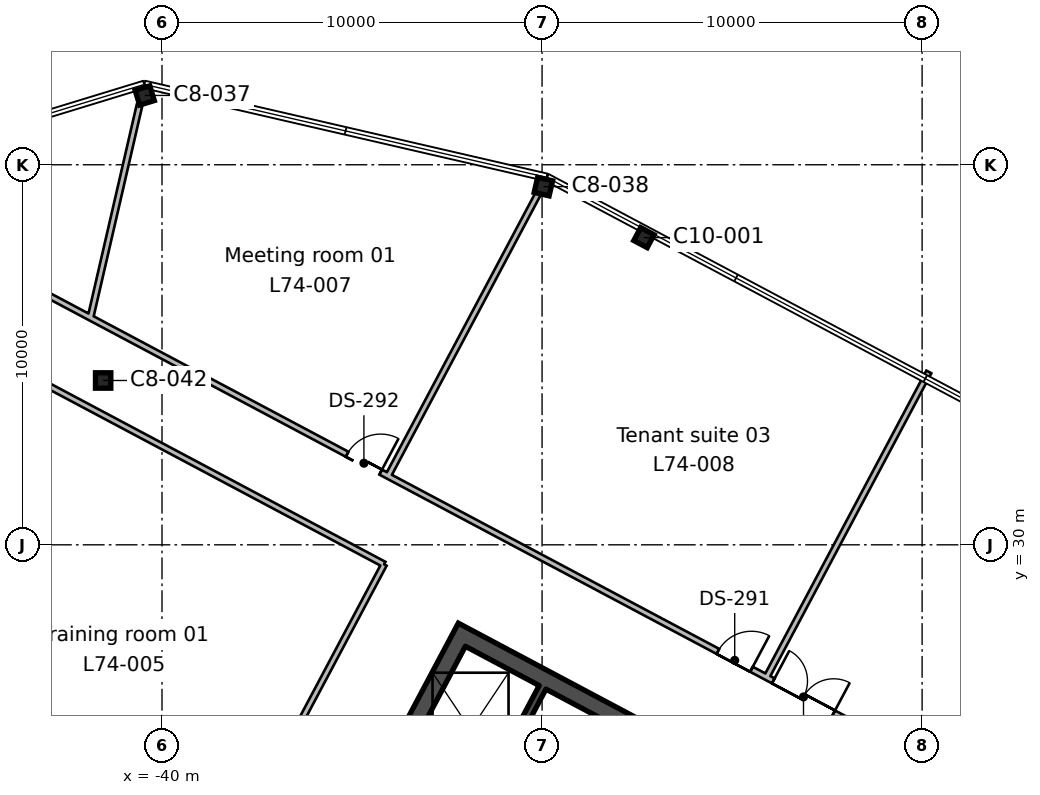
"""IFC4 building model, lengths in metres.
Left out: names, types, materials, properties, quantities, classifications, styles, units other than length and angle.
Written with IfcOpenShell. Run it as: python <this file> out.ifc"""

import sys

from ifc_helpers import new_model, si_unit, direction, frame, frame_2d, origin, origin_2d, place, context, subcontext, project, spatial, rectangle, i_section, extrude, element, fill, save


model = new_model("IFC4")
c1 = context("Model", 3, precision=1e-05, world=origin(), true_north=direction((0.0, 1.0)))
c2 = subcontext(c1, "Body", "Model", "MODEL_VIEW")
j1 = project(units=[si_unit("LENGTHUNIT", "METRE"), si_unit("PLANEANGLEUNIT", "RADIAN")], contexts=[c1])
p1 = place(None, origin())
s1 = spatial("IfcSite", under=j1, at=p1, CompositionType="ELEMENT")
p2 = place(p1, origin())
s2 = spatial("IfcBuilding", under=s1, at=p2, CompositionType="ELEMENT")
p3 = place(p2, frame((0.0, 0.0, 324.3)))
s3 = spatial("IfcBuildingStorey", under=s2, at=p3, CompositionType="ELEMENT", Elevation=324.3)
p4 = place(p3, frame((-41.549, 34.324, 0.0), z_axis=(0.0, 0.0, 1.0), x_axis=(1.0, 0.0, 0.0)))
e1 = element("IfcColumn", 1, at=p4, inside=s3, PredefinedType="COLUMN", context=c2, shape_type="SweptSolid", body=[
    extrude(i_section(OverallWidth=0.404, OverallDepth=0.406, WebThickness=0.027, FlangeThickness=0.044, FilletRadius=0.015, at=origin_2d()), origin(), (0.0, 0.0, 1.0), 3.9),
])
p5 = place(p3, frame((-27.319, 38.083, 0.0), z_axis=(0.0, 0.0, 1.0), x_axis=(-0.882947592859, 0.469471562786, 0.0)))
e2 = element("IfcColumn", 2, at=p5, inside=s3, PredefinedType="COLUMN", context=c2, shape_type="SweptSolid", body=[
    extrude(i_section(OverallWidth=0.399, OverallDepth=0.386, WebThickness=0.021, FlangeThickness=0.033, FilletRadius=0.015, at=origin_2d()), origin(), (0.0, 0.0, 1.0), 3.9),
])
for number, where, z_axis, x_axis in (
    (3, (-29.965, 39.425, 0.0), (0.0, 0.0, 1.0), (-0.974, 0.225, 0.0)),
    (4, (-40.455, 41.824, 0.0), (0.0, 0.0, 1.0), (-0.956, -0.292, 0.0)),
):
    element("IfcColumn", number, at=place(p3, frame(where, z_axis=z_axis, x_axis=x_axis)), inside=s3, PredefinedType="COLUMN", context=c2, shape_type="SweptSolid", body=[
        extrude(i_section(OverallWidth=0.404, OverallDepth=0.406, WebThickness=0.027, FlangeThickness=0.044, FilletRadius=0.015, at=origin_2d()), origin(), (0.0, 0.0, 1.0), 3.9),
    ])
p6 = place(p3, frame((-32.004, 27.833, 0.0), z_axis=(0.0, 0.0, 1.0), x_axis=(-0.469467968382, -0.882949504028, 0.0)))
e5 = element("IfcWall", 5, at=p6, inside=s3, PredefinedType="SHEAR", context=c2, shape_type="SweptSolid", body=[
    extrude(rectangle(XDim=19.1, YDim=0.45, at=frame_2d((9.55, 0.0))), origin(), (0.0, 0.0, 1.0), 3.9),
])
p7 = place(p6, frame((10.15, 0.0, 0.0)))
e6 = element("IfcOpeningElement", 6, at=p7, cuts=e5, PredefinedType="OPENING", context=c2, shape_type="SweptSolid", body=[
    extrude(rectangle(XDim=2.4, YDim=2.4, at=frame_2d((1.2, 1.2))), frame((0.0, 0.235, 0.0), z_axis=(0.0, -1.0, 0.0), x_axis=(1.0, 0.0, 0.0)), (0.0, 0.0, 1.0), 0.47),
])
p8 = place(p3, frame((-14.076, 18.045, 0.0), z_axis=(0.0, 0.0, 1.0), x_axis=(-0.882947755831, 0.46947125628, 0.0)))
e7 = element("IfcWall", 7, at=p8, inside=s3, PredefinedType="SHEAR", context=c2, shape_type="SweptSolid", body=[
    extrude(rectangle(XDim=20.2, YDim=0.45, at=frame_2d((10.1, 0.0))), origin(), (0.0, 0.0, 1.0), 3.9),
])
p9 = place(p3, frame((-29.986, 26.25, 0.0), z_axis=(0.0, 0.0, 1.0), x_axis=(-0.469494272526, -0.882935517501, 0.0)))
e8 = element("IfcWall", 8, at=p9, inside=s3, PredefinedType="SHEAR", context=c2, shape_type="SweptSolid", body=[
    extrude(rectangle(XDim=3.65, YDim=0.2, at=frame_2d((1.825, 0.0))), origin(), (0.0, 0.0, 1.0), 3.9),
])
p10 = place(p3, frame((-48.947, 39.73, 0.0), z_axis=(0.0, 0.0, 1.0), x_axis=(0.882945454821, -0.469475583828, 0.0)))
e9 = element("IfcWall", 9, at=p10, inside=s3, PredefinedType="PARTITIONING", context=c2, shape_type="SweptSolid", body=[
    extrude(rectangle(XDim=55.436, YDim=0.15, at=frame_2d((27.718, 0.0))), origin(), (0.0, 0.0, 1.0), 3.5),
])
p11 = place(p10, frame((28.35, 0.0, 0.0)))
e10 = element("IfcOpeningElement", 10, at=p11, cuts=e9, PredefinedType="OPENING", context=c2, shape_type="SweptSolid", body=[
    extrude(rectangle(XDim=1.8, YDim=2.1, at=frame_2d((0.9, 1.05))), frame((0.0, 0.085, 0.0), z_axis=(0.0, -1.0, 0.0), x_axis=(1.0, 0.0, 0.0)), (0.0, 0.0, 1.0), 0.17),
])
p12 = place(p10, frame((26.7, 0.0, 0.0)))
e11 = element("IfcOpeningElement", 11, at=p12, cuts=e9, PredefinedType="OPENING", context=c2, shape_type="SweptSolid", body=[
    extrude(rectangle(XDim=1.0, YDim=2.1, at=frame_2d((0.5, 1.05))), frame((0.0, 0.085, 0.0), z_axis=(0.0, -1.0, 0.0), x_axis=(1.0, 0.0, 0.0)), (0.0, 0.0, 1.0), 0.17),
])
p13 = place(p10, frame((15.65, 0.0, 0.0)))
e12 = element("IfcOpeningElement", 12, at=p13, cuts=e9, PredefinedType="OPENING", context=c2, shape_type="SweptSolid", body=[
    extrude(rectangle(XDim=1.0, YDim=2.1, at=frame_2d((0.5, 1.05))), frame((0.0, 0.085, 0.0), z_axis=(0.0, -1.0, 0.0), x_axis=(1.0, 0.0, 0.0)), (0.0, 0.0, 1.0), 0.17),
])
p14 = place(p3, frame((-42.984, 34.181, 0.0), z_axis=(0.0, 0.0, 1.0), x_axis=(0.882929457898, -0.469505668097, 0.0)))
e13 = element("IfcWall", 13, at=p14, inside=s3, PredefinedType="PARTITIONING", context=c2, shape_type="SweptSolid", body=[
    extrude(rectangle(XDim=10.0, YDim=0.15, at=frame_2d((5.0, 0.0))), origin(), (0.0, 0.0, 1.0), 3.5),
])
p15 = place(p3, frame((-34.155, 29.486, 0.0), z_axis=(0.0, 0.0, 1.0), x_axis=(-0.469446756585, -0.882960782103, 0.0)))
e14 = element("IfcWall", 14, at=p15, inside=s3, PredefinedType="PARTITIONING", context=c2, shape_type="SweptSolid", body=[
    extrude(rectangle(XDim=20.0, YDim=0.15, at=frame_2d((10.0, 0.0))), origin(), (0.0, 0.0, 1.0), 3.5),
])
p16 = place(p3, frame((-30.098, 39.247, 0.0), z_axis=(0.0, 0.0, 1.0), x_axis=(-0.469450486213, -0.882958799149, 0.0)))
e15 = element("IfcWall", 15, at=p16, inside=s3, PredefinedType="PARTITIONING", context=c2, shape_type="SweptSolid", body=[
    extrude(rectangle(XDim=8.423, YDim=0.15, at=frame_2d((4.211, 0.0))), origin(), (0.0, 0.0, 1.0), 3.5),
])
p17 = place(p3, frame((-41.883, 35.974, 0.0), z_axis=(0.0, 0.0, 1.0), x_axis=(0.22493705502, 0.974373296678, 0.0)))
e16 = element("IfcWall", 16, at=p17, inside=s3, PredefinedType="PARTITIONING", context=c2, shape_type="SweptSolid", body=[
    extrude(rectangle(XDim=5.748, YDim=0.15, at=frame_2d((2.874, 0.0))), origin(), (0.0, 0.0, 1.0), 3.5),
])
p18 = place(p3, frame((-19.822, 34.55, 0.0), z_axis=(0.0, 0.0, 1.0), x_axis=(-0.46943766298, -0.882965616871, 0.0)))
e17 = element("IfcWall", 17, at=p18, inside=s3, PredefinedType="PARTITIONING", context=c2, shape_type="SweptSolid", body=[
    extrude(rectangle(XDim=9.1, YDim=0.15, at=frame_2d((4.55, 0.0))), origin(), (0.0, 0.0, 1.0), 3.5),
])
p19 = place(p11, origin())
e18 = element("IfcDoor", 18, at=p19, inside=s3, OperationType="DOUBLE_DOOR_SINGLE_SWING", PredefinedType="DOOR", context=c2, shape_type="SweptSolid", body=[
    extrude(rectangle(XDim=1.8, YDim=2.1, at=frame_2d((0.9, 1.05))), frame((0.0, 0.025, 0.0), z_axis=(0.0, -1.0, 0.0), x_axis=(1.0, 0.0, 0.0)), (0.0, 0.0, 1.0), 0.05),
])
fill(e10, e18)
p20 = place(p12, origin())
e19 = element("IfcDoor", 19, at=p20, inside=s3, OperationType="SINGLE_SWING_RIGHT", PredefinedType="DOOR", context=c2, shape_type="SweptSolid", body=[
    extrude(rectangle(XDim=1.0, YDim=2.1, at=frame_2d((0.5, 1.05))), frame((0.0, 0.025, 0.0), z_axis=(0.0, -1.0, 0.0), x_axis=(1.0, 0.0, 0.0)), (0.0, 0.0, 1.0), 0.05),
])
fill(e11, e19)
p21 = place(p13, origin())
e20 = element("IfcDoor", 20, at=p21, inside=s3, OperationType="SINGLE_SWING_RIGHT", PredefinedType="DOOR", context=c2, shape_type="SweptSolid", body=[
    extrude(rectangle(XDim=1.0, YDim=2.1, at=frame_2d((0.5, 1.05))), frame((0.0, 0.025, 0.0), z_axis=(0.0, -1.0, 0.0), x_axis=(1.0, 0.0, 0.0)), (0.0, 0.0, 1.0), 0.05),
])
fill(e12, e20)
save(model, sys.argv[1])
